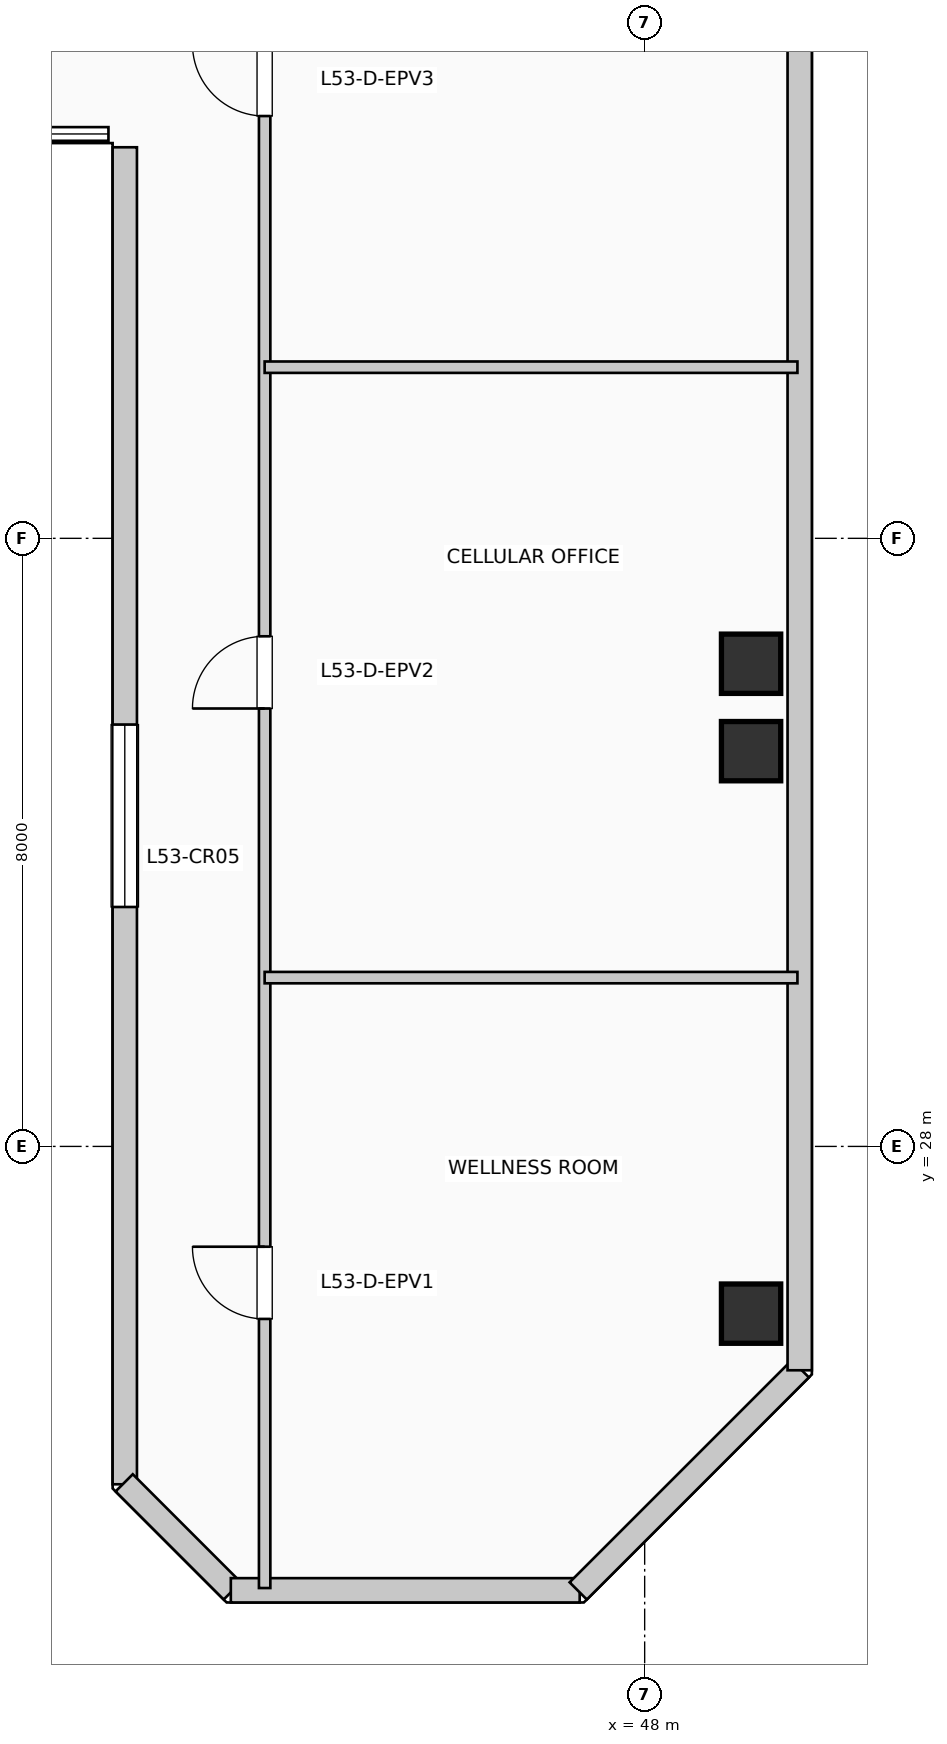
"""IFC4 building model, lengths in metres.
Left out: names, types, materials, properties, quantities, classifications, styles, units other than length and angle.
Written with IfcOpenShell. Run it as: python <this file> out.ifc"""

import sys

from ifc_helpers import new_model, si_unit, direction, frame, frame_2d, origin, origin_2d, place, context, subcontext, project, spatial, rectangle, extrude, element, fill, save


model = new_model("IFC4")
c1 = context("Model", 3, precision=1e-05, world=origin(), true_north=direction((0.0, 1.0)))
c2 = subcontext(c1, "Body", "Model", "MODEL_VIEW")
j1 = project(units=[si_unit("LENGTHUNIT", "METRE"), si_unit("PLANEANGLEUNIT", "RADIAN")], contexts=[c1])
p1 = place(None, origin())
s1 = spatial("IfcSite", under=j1, at=p1, CompositionType="ELEMENT")
p2 = place(p1, origin())
s2 = spatial("IfcBuilding", under=s1, at=p2, CompositionType="ELEMENT")
p3 = place(p2, frame((0.0, 0.0, 219.78)))
s3 = spatial("IfcBuildingStorey", under=s2, at=p3, CompositionType="ELEMENT", Elevation=219.78)
for number, where, z_axis, x_axis in (
    (1, (49.4, 25.8, 0.0), (0.0, 0.0, 1.0), (1.0, 0.0, 0.0)),
    (2, (49.4, 33.2, 0.0), (0.0, 0.0, 1.0), (1.0, 0.0, 0.0)),
    (3, (49.4, 34.35, 0.0), (0.0, 0.0, 1.0), (1.0, 0.0, 0.0)),
):
    element("IfcColumn", number, at=place(p3, frame(where, z_axis=z_axis, x_axis=x_axis)), inside=s3, PredefinedType="COLUMN", context=c2, shape_type="SweptSolid", body=[
        extrude(rectangle(XDim=0.78, YDim=0.78, at=origin_2d()), origin(), (0.0, 0.0, 1.0), 3.96),
    ])
p4 = place(p3, frame((41.16, 41.145, 0.0), z_axis=(0.0, 0.0, 1.0), x_axis=(0.0, -1.0, 0.0)))
e4 = element("IfcWall", 4, at=p4, inside=s3, PredefinedType="SOLIDWALL", context=c2, shape_type="SweptSolid", body=[
    extrude(rectangle(XDim=17.59, YDim=0.32, at=frame_2d((8.795, 0.0))), origin(), (0.0, 0.0, 1.0), 3.71),
])
p5 = place(p4, frame((7.595, 0.0, 0.85)))
e5 = element("IfcOpeningElement", 5, at=p5, cuts=e4, PredefinedType="OPENING", context=c2, shape_type="SweptSolid", body=[
    extrude(rectangle(XDim=2.4, YDim=2.05, at=frame_2d((1.2, 1.025))), frame((0.0, 0.17, 0.0), z_axis=(0.0, -1.0, 0.0), x_axis=(1.0, 0.0, 0.0)), (0.0, 0.0, 1.0), 0.34),
])
p6 = place(p3, frame((41.152, 23.574, 0.0), z_axis=(0.0, 0.0, 1.0), x_axis=(0.707106781187, -0.707106781187, 0.0)))
e6 = element("IfcWall", 6, at=p6, inside=s3, PredefinedType="SOLIDWALL", context=c2, shape_type="SweptSolid", body=[
    extrude(rectangle(XDim=2.011, YDim=0.32, at=frame_2d((1.006, 0.0))), origin(), (0.0, 0.0, 1.0), 3.71),
])
p7 = place(p3, frame((42.555, 22.16, 0.0), z_axis=(0.0, 0.0, 1.0), x_axis=(1.0, 0.0, 0.0)))
e7 = element("IfcWall", 7, at=p7, inside=s3, PredefinedType="SOLIDWALL", context=c2, shape_type="SweptSolid", body=[
    extrude(rectangle(XDim=4.59, YDim=0.32, at=frame_2d((2.295, 0.0))), origin(), (0.0, 0.0, 1.0), 3.71),
])
p8 = place(p3, frame((47.126, 22.152, 0.0), z_axis=(0.0, 0.0, 1.0), x_axis=(0.707136318428, 0.707077242712, 0.0)))
e8 = element("IfcWall", 8, at=p8, inside=s3, PredefinedType="SOLIDWALL", context=c2, shape_type="SweptSolid", body=[
    extrude(rectangle(XDim=4.133, YDim=0.32, at=frame_2d((2.066, 0.0))), origin(), (0.0, 0.0, 1.0), 3.71),
])
p9 = place(p3, frame((50.04, 25.055, 0.0), z_axis=(0.0, 0.0, 1.0), x_axis=(0.0, 1.0, 0.0)))
e9 = element("IfcWall", 9, at=p9, inside=s3, PredefinedType="SOLIDWALL", context=c2, shape_type="SweptSolid", body=[
    extrude(rectangle(XDim=17.89, YDim=0.32, at=frame_2d((8.945, 0.0))), origin(), (0.0, 0.0, 1.0), 3.71),
])
p10 = place(p3, frame((43.0, 22.19, 0.0), z_axis=(0.0, 0.0, 1.0), x_axis=(0.0, 1.0, 0.0)))
e10 = element("IfcWall", 10, at=p10, inside=s3, PredefinedType="PARTITIONING", context=c2, shape_type="SweptSolid", body=[
    extrude(rectangle(XDim=23.62, YDim=0.15, at=frame_2d((11.81, 0.0))), origin(), (0.0, 0.0, 1.0), 3.71),
])
p11 = place(p10, frame((3.54, 0.0, 0.0)))
e11 = element("IfcOpeningElement", 11, at=p11, cuts=e10, PredefinedType="OPENING", context=c2, shape_type="SweptSolid", body=[
    extrude(rectangle(XDim=0.95, YDim=2.15, at=frame_2d((0.475, 1.075))), frame((0.0, 0.085, 0.0), z_axis=(0.0, -1.0, 0.0), x_axis=(1.0, 0.0, 0.0)), (0.0, 0.0, 1.0), 0.17),
])
p12 = place(p10, frame((11.571, 0.0, 0.0)))
e12 = element("IfcOpeningElement", 12, at=p12, cuts=e10, PredefinedType="OPENING", context=c2, shape_type="SweptSolid", body=[
    extrude(rectangle(XDim=0.95, YDim=2.15, at=frame_2d((0.475, 1.075))), frame((0.0, 0.085, 0.0), z_axis=(0.0, -1.0, 0.0), x_axis=(1.0, 0.0, 0.0)), (0.0, 0.0, 1.0), 0.17),
])
p13 = place(p10, frame((19.366, 0.0, 0.0)))
e13 = element("IfcOpeningElement", 13, at=p13, cuts=e10, PredefinedType="OPENING", context=c2, shape_type="SweptSolid", body=[
    extrude(rectangle(XDim=0.95, YDim=2.15, at=frame_2d((0.475, 1.075))), frame((0.0, 0.085, 0.0), z_axis=(0.0, -1.0, 0.0), x_axis=(1.0, 0.0, 0.0)), (0.0, 0.0, 1.0), 0.17),
])
for number, where, z_axis, x_axis in (
    (14, (43.0, 30.221, 0.0), (0.0, 0.0, 1.0), (1.0, 0.0, 0.0)),
    (15, (43.0, 38.252, 0.0), (0.0, 0.0, 1.0), (1.0, 0.0, 0.0)),
):
    element("IfcWall", number, at=place(p3, frame(where, z_axis=z_axis, x_axis=x_axis)), inside=s3, PredefinedType="PARTITIONING", context=c2, shape_type="SweptSolid", body=[
        extrude(rectangle(XDim=7.01, YDim=0.15, at=frame_2d((3.505, 0.0))), origin(), (0.0, 0.0, 1.0), 3.71),
    ])
p14 = place(p5, origin())
e16 = element("IfcWindow", 16, at=p14, inside=s3, PartitioningType="SINGLE_PANEL", PredefinedType="WINDOW", context=c2, shape_type="SweptSolid", body=[
    extrude(rectangle(XDim=2.4, YDim=2.05, at=frame_2d((1.2, 1.025))), frame((0.0, 0.03, 0.0), z_axis=(0.0, -1.0, 0.0), x_axis=(1.0, 0.0, 0.0)), (0.0, 0.0, 1.0), 0.06),
])
fill(e5, e16)
p15 = place(p11, origin())
e17 = element("IfcDoor", 17, at=p15, inside=s3, OperationType="SINGLE_SWING_RIGHT", PredefinedType="DOOR", context=c2, shape_type="SweptSolid", body=[
    extrude(rectangle(XDim=0.95, YDim=2.15, at=frame_2d((0.475, 1.075))), frame((0.0, 0.025, 0.0), z_axis=(0.0, -1.0, 0.0), x_axis=(1.0, 0.0, 0.0)), (0.0, 0.0, 1.0), 0.05),
])
fill(e11, e17)
p16 = place(p12, origin())
e18 = element("IfcDoor", 18, at=p16, inside=s3, OperationType="SINGLE_SWING_LEFT", PredefinedType="DOOR", context=c2, shape_type="SweptSolid", body=[
    extrude(rectangle(XDim=0.95, YDim=2.15, at=frame_2d((0.475, 1.075))), frame((0.0, 0.025, 0.0), z_axis=(0.0, -1.0, 0.0), x_axis=(1.0, 0.0, 0.0)), (0.0, 0.0, 1.0), 0.05),
])
fill(e12, e18)
p17 = place(p13, origin())
e19 = element("IfcDoor", 19, at=p17, inside=s3, OperationType="SINGLE_SWING_RIGHT", PredefinedType="DOOR", context=c2, shape_type="SweptSolid", body=[
    extrude(rectangle(XDim=0.95, YDim=2.15, at=frame_2d((0.475, 1.075))), frame((0.0, 0.025, 0.0), z_axis=(0.0, -1.0, 0.0), x_axis=(1.0, 0.0, 0.0)), (0.0, 0.0, 1.0), 0.05),
])
fill(e13, e19)
save(model, sys.argv[1])
